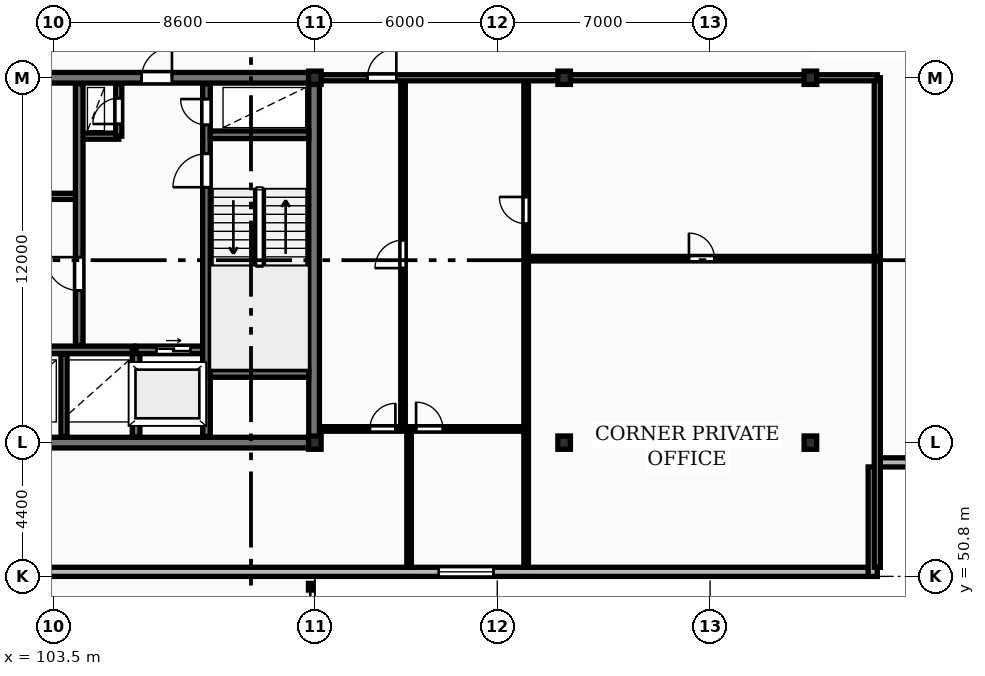
"""IFC4 building model, lengths in metres.
Left out: names, types, materials, properties, quantities, classifications, styles, units other than length and angle.
Written with IfcOpenShell. Run it as: python <this file> out.ifc"""

import sys

from ifc_helpers import new_model, si_unit, direction, frame, frame_2d, origin, origin_2d, place, context, subcontext, project, spatial, rectangle, i_section, extrude, element, fill, save


model = new_model("IFC4")
c1 = context("Model", 3, precision=1e-05, world=origin(), true_north=direction((0.0, 1.0)))
c2 = subcontext(c1, "Body", "Model", "MODEL_VIEW")
j1 = project(units=[si_unit("LENGTHUNIT", "METRE"), si_unit("PLANEANGLEUNIT", "RADIAN")], contexts=[c1])
p1 = place(None, origin())
s1 = spatial("IfcSite", under=j1, at=p1, CompositionType="ELEMENT")
p2 = place(p1, origin())
s2 = spatial("IfcBuilding", under=s1, at=p2, CompositionType="ELEMENT")
p3 = place(p2, frame((0.0, 0.0, 146.5)))
s3 = spatial("IfcBuildingStorey", under=s2, at=p3, CompositionType="ELEMENT", Elevation=146.5)
for number, where, z_axis, x_axis in (
    (1, (112.1, 55.2, 0.0), (0.0, 0.0, 1.0), (1.0, 0.0, 0.0)),
    (2, (112.1, 67.2, 0.0), (0.0, 0.0, 1.0), (1.0, 0.0, 0.0)),
    (3, (120.3, 55.2, 0.0), (0.0, 0.0, 1.0), (1.0, 0.0, 0.0)),
    (4, (120.3, 67.2, 0.0), (0.0, 0.0, 1.0), (1.0, 0.0, 0.0)),
    (5, (128.4, 55.2, 0.0), (0.0, 0.0, 1.0), (1.0, 0.0, 0.0)),
    (6, (128.4, 67.2, 0.0), (0.0, 0.0, 1.0), (1.0, 0.0, 0.0)),
):
    element("IfcColumn", number, at=place(p3, frame(where, z_axis=z_axis, x_axis=x_axis)), inside=s3, PredefinedType="COLUMN", context=c2, shape_type="SweptSolid", body=[
        extrude(i_section(OverallWidth=0.412, OverallDepth=0.437, WebThickness=0.036, FlangeThickness=0.052, FilletRadius=0.015, at=origin_2d()), origin(), (0.0, 0.0, 1.0), 3.6),
    ])
p4 = place(p3, frame((57.6, 50.95, 0.0), z_axis=(0.0, 0.0, 1.0), x_axis=(1.0, 0.0, 0.0)))
e7 = element("IfcWall", 7, at=p4, inside=s3, PredefinedType="STANDARD", context=c2, shape_type="SweptSolid", body=[
    extrude(rectangle(XDim=73.0, YDim=0.3, at=frame_2d((36.5, 0.0))), origin(), (0.0, 0.0, 1.0), 3.31),
])
p5 = place(p4, frame((15.225, 0.0, 0.85)))
e8 = element("IfcOpeningElement", 8, at=p5, cuts=e7, PredefinedType="OPENING", context=c2, shape_type="SweptSolid", body=[
    extrude(rectangle(XDim=1.8, YDim=1.8, at=frame_2d((0.9, 0.9))), frame((0.0, 0.16, 0.0), z_axis=(0.0, -1.0, 0.0), x_axis=(1.0, 0.0, 0.0)), (0.0, 0.0, 1.0), 0.32),
])
p6 = place(p4, frame((58.575, 0.0, 0.85)))
e9 = element("IfcOpeningElement", 9, at=p6, cuts=e7, PredefinedType="OPENING", context=c2, shape_type="SweptSolid", body=[
    extrude(rectangle(XDim=1.8, YDim=1.8, at=frame_2d((0.9, 0.9))), frame((0.0, 0.16, 0.0), z_axis=(0.0, -1.0, 0.0), x_axis=(1.0, 0.0, 0.0)), (0.0, 0.0, 1.0), 0.32),
])
p7 = place(p4, frame((33.45, 0.0, 0.0)))
e10 = element("IfcOpeningElement", 10, at=p7, cuts=e7, PredefinedType="OPENING", context=c2, shape_type="SweptSolid", body=[
    extrude(rectangle(XDim=1.1, YDim=2.1, at=frame_2d((0.55, 1.05))), frame((0.0, 0.16, 0.0), z_axis=(0.0, -1.0, 0.0), x_axis=(1.0, 0.0, 0.0)), (0.0, 0.0, 1.0), 0.32),
])
for number, where, z_axis, x_axis in (
    (11, (130.45, 50.8, 0.0), (0.0, 0.0, 1.0), (0.0, 1.0, 0.0)),
    (12, (130.6, 54.55, 0.0), (0.0, 0.0, 1.0), (1.0, 0.0, 0.0)),
):
    element("IfcWall", number, at=place(p3, frame(where, z_axis=z_axis, x_axis=x_axis)), inside=s3, PredefinedType="STANDARD", context=c2, shape_type="SweptSolid", body=[
        extrude(rectangle(XDim=3.6, YDim=0.3, at=frame_2d((1.8, 0.0))), origin(), (0.0, 0.0, 1.0), 3.31),
    ])
p8 = place(p3, frame((75.95, 55.2, 0.0), z_axis=(0.0, 0.0, 1.0), x_axis=(1.0, 0.0, 0.0)))
e13 = element("IfcWall", 13, at=p8, inside=s3, PredefinedType="SHEAR", context=c2, shape_type="SweptSolid", body=[
    extrude(rectangle(XDim=36.3, YDim=0.35, at=frame_2d((18.15, 0.0))), origin(), (0.0, 0.0, 1.0), 3.6),
])
p9 = place(p8, frame((15.1, 0.0, 0.0)))
e14 = element("IfcOpeningElement", 14, at=p9, cuts=e13, PredefinedType="OPENING", context=c2, shape_type="SweptSolid", body=[
    extrude(rectangle(XDim=1.1, YDim=2.1, at=frame_2d((0.55, 1.05))), frame((0.0, 0.185, 0.0), z_axis=(0.0, -1.0, 0.0), x_axis=(1.0, 0.0, 0.0)), (0.0, 0.0, 1.0), 0.37),
])
p10 = place(p3, frame((112.075, 55.375, 0.0), z_axis=(0.0, 0.0, 1.0), x_axis=(0.0, 1.0, 0.0)))
e15 = element("IfcWall", 15, at=p10, inside=s3, PredefinedType="SHEAR", context=c2, shape_type="SweptSolid", body=[
    extrude(rectangle(XDim=11.65, YDim=0.35, at=frame_2d((5.825, 0.0))), origin(), (0.0, 0.0, 1.0), 3.6),
])
p11 = place(p3, frame((75.95, 67.2, 0.0), z_axis=(0.0, 0.0, 1.0), x_axis=(1.0, 0.0, 0.0)))
e16 = element("IfcWall", 16, at=p11, inside=s3, PredefinedType="SHEAR", context=c2, shape_type="SweptSolid", body=[
    extrude(rectangle(XDim=36.3, YDim=0.35, at=frame_2d((18.15, 0.0))), origin(), (0.0, 0.0, 1.0), 3.6),
])
p12 = place(p11, frame((5.25, 0.0, 0.0)))
e17 = element("IfcOpeningElement", 17, at=p12, cuts=e16, PredefinedType="OPENING", context=c2, shape_type="SweptSolid", body=[
    extrude(rectangle(XDim=1.0, YDim=2.15, at=frame_2d((0.5, 1.075))), frame((0.0, 0.185, 0.0), z_axis=(0.0, -1.0, 0.0), x_axis=(1.0, 0.0, 0.0)), (0.0, 0.0, 1.0), 0.37),
])
p13 = place(p11, frame((21.6, 0.0, 0.0)))
e18 = element("IfcOpeningElement", 18, at=p13, cuts=e16, PredefinedType="OPENING", context=c2, shape_type="SweptSolid", body=[
    extrude(rectangle(XDim=1.5, YDim=2.2, at=frame_2d((0.75, 1.1))), frame((0.0, 0.185, 0.0), z_axis=(0.0, -1.0, 0.0), x_axis=(1.0, 0.0, 0.0)), (0.0, 0.0, 1.0), 0.37),
])
p14 = place(p11, frame((30.45, 0.0, 0.0)))
e19 = element("IfcOpeningElement", 19, at=p14, cuts=e16, PredefinedType="OPENING", context=c2, shape_type="SweptSolid", body=[
    extrude(rectangle(XDim=1.0, YDim=2.15, at=frame_2d((0.5, 1.075))), frame((0.0, 0.185, 0.0), z_axis=(0.0, -1.0, 0.0), x_axis=(1.0, 0.0, 0.0)), (0.0, 0.0, 1.0), 0.37),
])
p15 = place(p3, frame((103.85, 55.4, 0.0), z_axis=(0.0, 0.0, 1.0), x_axis=(0.0, 1.0, 0.0)))
e20 = element("IfcWall", 20, at=p15, inside=s3, PredefinedType="PARTITIONING", context=c2, shape_type="SweptSolid", body=[
    extrude(rectangle(XDim=2.72, YDim=0.2, at=frame_2d((1.36, 0.0))), origin(), (0.0, 0.0, 1.0), 3.31),
])
p16 = place(p3, frame((101.55, 58.25, 0.0), z_axis=(0.0, 0.0, 1.0), x_axis=(1.0, 0.0, 0.0)))
e21 = element("IfcWall", 21, at=p16, inside=s3, PredefinedType="SHEAR", context=c2, shape_type="SweptSolid", body=[
    extrude(rectangle(XDim=4.6, YDim=0.25, at=frame_2d((2.3, 0.0))), origin(), (0.0, 0.0, 1.0), 3.6),
])
p17 = place(p3, frame((106.22, 55.4, 0.0), z_axis=(0.0, 0.0, 1.0), x_axis=(0.0, 1.0, 0.0)))
e22 = element("IfcWall", 22, at=p17, inside=s3, PredefinedType="SHEAR", context=c2, shape_type="SweptSolid", body=[
    extrude(rectangle(XDim=2.85, YDim=0.25, at=frame_2d((1.425, 0.0))), origin(), (0.0, 0.0, 1.0), 3.6),
])
p18 = place(p3, frame((106.22, 58.25, 0.0), z_axis=(0.0, 0.0, 1.0), x_axis=(1.0, 0.0, 0.0)))
e23 = element("IfcWall", 23, at=p18, inside=s3, PredefinedType="SHEAR", context=c2, shape_type="SweptSolid", body=[
    extrude(rectangle(XDim=2.46, YDim=0.25, at=frame_2d((1.23, 0.0))), origin(), (0.0, 0.0, 1.0), 3.6),
])
p19 = place(p18, frame((0.67, 0.0, 0.0)))
e24 = element("IfcOpeningElement", 24, at=p19, cuts=e23, PredefinedType="OPENING", context=c2, shape_type="SweptSolid", body=[
    extrude(rectangle(XDim=1.12, YDim=2.12, at=frame_2d((0.56, 1.06))), frame((0.0, 0.135, 0.0), z_axis=(0.0, -1.0, 0.0), x_axis=(1.0, 0.0, 0.0)), (0.0, 0.0, 1.0), 0.27),
])
p20 = place(p3, frame((84.42, 63.3, 0.0), z_axis=(0.0, 0.0, 1.0), x_axis=(1.0, 0.0, 0.0)))
e25 = element("IfcWall", 25, at=p20, inside=s3, PredefinedType="PARTITIONING", context=c2, shape_type="SweptSolid", body=[
    extrude(rectangle(XDim=19.83, YDim=0.2, at=frame_2d((9.915, 0.0))), origin(), (0.0, 0.0, 1.0), 3.31),
])
p21 = place(p20, frame((1.15, 0.0, 0.0)))
e26 = element("IfcOpeningElement", 26, at=p21, cuts=e25, PredefinedType="OPENING", context=c2, shape_type="SweptSolid", body=[
    extrude(rectangle(XDim=0.85, YDim=2.05, at=frame_2d((0.425, 1.025))), frame((0.0, 0.11, 0.0), z_axis=(0.0, -1.0, 0.0), x_axis=(1.0, 0.0, 0.0)), (0.0, 0.0, 1.0), 0.22),
])
p22 = place(p20, frame((3.25, 0.0, 0.0)))
e27 = element("IfcOpeningElement", 27, at=p22, cuts=e25, PredefinedType="OPENING", context=c2, shape_type="SweptSolid", body=[
    extrude(rectangle(XDim=0.85, YDim=2.05, at=frame_2d((0.425, 1.025))), frame((0.0, 0.11, 0.0), z_axis=(0.0, -1.0, 0.0), x_axis=(1.0, 0.0, 0.0)), (0.0, 0.0, 1.0), 0.22),
])
p23 = place(p20, frame((13.08, 0.0, 0.0)))
e28 = element("IfcOpeningElement", 28, at=p23, cuts=e25, PredefinedType="OPENING", context=c2, shape_type="SweptSolid", body=[
    extrude(rectangle(XDim=1.5, YDim=2.2, at=frame_2d((0.75, 1.1))), frame((0.0, 0.11, 0.0), z_axis=(0.0, -1.0, 0.0), x_axis=(1.0, 0.0, 0.0)), (0.0, 0.0, 1.0), 0.22),
])
p24 = place(p20, frame((6.78, 0.0, 0.0)))
e29 = element("IfcOpeningElement", 29, at=p24, cuts=e25, PredefinedType="OPENING", context=c2, shape_type="SweptSolid", body=[
    extrude(rectangle(XDim=0.92, YDim=2.08, at=frame_2d((0.46, 1.04))), frame((0.0, 0.11, 0.0), z_axis=(0.0, -1.0, 0.0), x_axis=(1.0, 0.0, 0.0)), (0.0, 0.0, 1.0), 0.22),
])
p25 = place(p20, frame((16.28, 0.0, 0.0)))
e30 = element("IfcOpeningElement", 30, at=p25, cuts=e25, PredefinedType="OPENING", context=c2, shape_type="SweptSolid", body=[
    extrude(rectangle(XDim=0.92, YDim=2.08, at=frame_2d((0.46, 1.04))), frame((0.0, 0.11, 0.0), z_axis=(0.0, -1.0, 0.0), x_axis=(1.0, 0.0, 0.0)), (0.0, 0.0, 1.0), 0.22),
])
p26 = place(p3, frame((104.45, 65.28, 0.0), z_axis=(0.0, 0.0, 1.0), x_axis=(1.0, 0.0, 0.0)))
e31 = element("IfcWall", 31, at=p26, inside=s3, PredefinedType="PARTITIONING", context=c2, shape_type="SweptSolid", body=[
    extrude(rectangle(XDim=1.2, YDim=0.2, at=frame_2d((0.6, 0.0))), origin(), (0.0, 0.0, 1.0), 3.31),
])
p27 = place(p3, frame((105.65, 65.28, 0.0), z_axis=(0.0, 0.0, 1.0), x_axis=(0.0, 1.0, 0.0)))
e32 = element("IfcWall", 32, at=p27, inside=s3, PredefinedType="PARTITIONING", context=c2, shape_type="SweptSolid", body=[
    extrude(rectangle(XDim=1.72, YDim=0.2, at=frame_2d((0.86, 0.0))), origin(), (0.0, 0.0, 1.0), 3.31),
])
p28 = place(p27, frame((0.4, 0.0, 0.0)))
e33 = element("IfcOpeningElement", 33, at=p28, cuts=e32, PredefinedType="OPENING", context=c2, shape_type="SweptSolid", body=[
    extrude(rectangle(XDim=0.85, YDim=2.05, at=frame_2d((0.425, 1.025))), frame((0.0, 0.11, 0.0), z_axis=(0.0, -1.0, 0.0), x_axis=(1.0, 0.0, 0.0)), (0.0, 0.0, 1.0), 0.22),
])
p29 = place(p3, frame((104.35, 58.4, 0.0), z_axis=(0.0, 0.0, 1.0), x_axis=(0.0, 1.0, 0.0)))
e34 = element("IfcWall", 34, at=p29, inside=s3, PredefinedType="SHEAR", context=c2, shape_type="SweptSolid", body=[
    extrude(rectangle(XDim=8.6, YDim=0.25, at=frame_2d((4.3, 0.0))), origin(), (0.0, 0.0, 1.0), 3.6),
])
p30 = place(p29, frame((1.8, 0.0, 0.0)))
e35 = element("IfcOpeningElement", 35, at=p30, cuts=e34, PredefinedType="OPENING", context=c2, shape_type="SweptSolid", body=[
    extrude(rectangle(XDim=1.1, YDim=2.1, at=frame_2d((0.55, 1.05))), frame((0.0, 0.135, 0.0), z_axis=(0.0, -1.0, 0.0), x_axis=(1.0, 0.0, 0.0)), (0.0, 0.0, 1.0), 0.27),
])
p31 = place(p3, frame((108.535, 55.4, 0.0), z_axis=(0.0, 0.0, 1.0), x_axis=(0.0, 1.0, 0.0)))
e36 = element("IfcWall", 36, at=p31, inside=s3, PredefinedType="SHEAR", context=c2, shape_type="SweptSolid", body=[
    extrude(rectangle(XDim=11.6, YDim=0.25, at=frame_2d((5.8, 0.0))), origin(), (0.0, 0.0, 1.0), 3.6),
])
p32 = place(p31, frame((8.2, 0.0, 0.0)))
e37 = element("IfcOpeningElement", 37, at=p32, cuts=e36, PredefinedType="OPENING", context=c2, shape_type="SweptSolid", body=[
    extrude(rectangle(XDim=1.1, YDim=2.1, at=frame_2d((0.55, 1.05))), frame((0.0, 0.135, 0.0), z_axis=(0.0, -1.0, 0.0), x_axis=(1.0, 0.0, 0.0)), (0.0, 0.0, 1.0), 0.27),
])
p33 = place(p31, frame((10.25, 0.0, 0.0)))
e38 = element("IfcOpeningElement", 38, at=p33, cuts=e36, PredefinedType="OPENING", context=c2, shape_type="SweptSolid", body=[
    extrude(rectangle(XDim=0.85, YDim=2.05, at=frame_2d((0.425, 1.025))), frame((0.0, 0.135, 0.0), z_axis=(0.0, -1.0, 0.0), x_axis=(1.0, 0.0, 0.0)), (0.0, 0.0, 1.0), 0.27),
])
for number, where, z_axis, x_axis in (
    (39, (108.66, 57.475, 0.0), (0.0, 0.0, 1.0), (1.0, 0.0, 0.0)),
    (40, (108.66, 65.325, 0.0), (0.0, 0.0, 1.0), (1.0, 0.0, 0.0)),
):
    element("IfcWall", number, at=place(p3, frame(where, z_axis=z_axis, x_axis=x_axis)), inside=s3, PredefinedType="SHEAR", context=c2, shape_type="SweptSolid", body=[
        extrude(rectangle(XDim=3.24, YDim=0.25, at=frame_2d((1.62, 0.0))), origin(), (0.0, 0.0, 1.0), 3.6),
    ])
p34 = place(p3, frame((130.6, 51.1, 0.0), z_axis=(0.0, 0.0, 1.0), x_axis=(0.0, 1.0, 0.0)))
e41 = element("IfcWall", 41, at=p34, inside=s3, PredefinedType="PARTITIONING", context=c2, shape_type="SweptSolid", body=[
    extrude(rectangle(XDim=16.1, YDim=0.2, at=frame_2d((8.05, 0.0))), origin(), (0.0, 0.0, 1.0), 3.31),
])
p35 = place(p3, frame((119.05, 61.25, 0.0), z_axis=(0.0, 0.0, 1.0), x_axis=(1.0, 0.0, 0.0)))
e42 = element("IfcWall", 42, at=p35, inside=s3, PredefinedType="PARTITIONING", context=c2, shape_type="SweptSolid", body=[
    extrude(rectangle(XDim=11.55, YDim=0.15, at=frame_2d((5.775, 0.0))), origin(), (0.0, 0.0, 1.0), 3.31),
])
p36 = place(p35, frame((5.355, 0.0, 0.0)))
e43 = element("IfcOpeningElement", 43, at=p36, cuts=e42, PredefinedType="OPENING", context=c2, shape_type="SweptSolid", body=[
    extrude(rectangle(XDim=0.84, YDim=2.04, at=frame_2d((0.42, 1.02))), frame((0.0, 0.085, 0.0), z_axis=(0.0, -1.0, 0.0), x_axis=(1.0, 0.0, 0.0)), (0.0, 0.0, 1.0), 0.17),
])
p37 = place(p3, frame((119.05, 51.1, 0.0), z_axis=(0.0, 0.0, 1.0), x_axis=(0.0, 1.0, 0.0)))
e44 = element("IfcWall", 44, at=p37, inside=s3, PredefinedType="PARTITIONING", context=c2, shape_type="SweptSolid", body=[
    extrude(rectangle(XDim=16.05, YDim=0.15, at=frame_2d((8.025, 0.0))), origin(), (0.0, 0.0, 1.0), 3.31),
])
p38 = place(p37, frame((11.3, 0.0, 0.0)))
e45 = element("IfcOpeningElement", 45, at=p38, cuts=e44, PredefinedType="OPENING", context=c2, shape_type="SweptSolid", body=[
    extrude(rectangle(XDim=0.88, YDim=2.06, at=frame_2d((0.44, 1.03))), frame((0.0, 0.085, 0.0), z_axis=(0.0, -1.0, 0.0), x_axis=(1.0, 0.0, 0.0)), (0.0, 0.0, 1.0), 0.17),
])
p39 = place(p3, frame((115.0, 55.65, 0.0), z_axis=(0.0, 0.0, 1.0), x_axis=(0.0, 1.0, 0.0)))
e46 = element("IfcWall", 46, at=p39, inside=s3, PredefinedType="PARTITIONING", context=c2, shape_type="SweptSolid", body=[
    extrude(rectangle(XDim=11.5, YDim=0.15, at=frame_2d((5.75, 0.0))), origin(), (0.0, 0.0, 1.0), 3.31),
])
p40 = place(p39, frame((5.29, 0.0, 0.0)))
e47 = element("IfcOpeningElement", 47, at=p40, cuts=e46, PredefinedType="OPENING", context=c2, shape_type="SweptSolid", body=[
    extrude(rectangle(XDim=0.92, YDim=2.08, at=frame_2d((0.46, 1.04))), frame((0.0, 0.085, 0.0), z_axis=(0.0, -1.0, 0.0), x_axis=(1.0, 0.0, 0.0)), (0.0, 0.0, 1.0), 0.17),
])
p41 = place(p3, frame((115.2, 51.1, 0.0), z_axis=(0.0, 0.0, 1.0), x_axis=(0.0, 1.0, 0.0)))
e48 = element("IfcWall", 48, at=p41, inside=s3, PredefinedType="PARTITIONING", context=c2, shape_type="SweptSolid", body=[
    extrude(rectangle(XDim=4.55, YDim=0.15, at=frame_2d((2.275, 0.0))), origin(), (0.0, 0.0, 1.0), 3.31),
])
p42 = place(p3, frame((112.27, 55.65, 0.0), z_axis=(0.0, 0.0, 1.0), x_axis=(1.0, 0.0, 0.0)))
e49 = element("IfcWall", 49, at=p42, inside=s3, PredefinedType="PARTITIONING", context=c2, shape_type="SweptSolid", body=[
    extrude(rectangle(XDim=6.76, YDim=0.15, at=frame_2d((3.38, 0.0))), origin(), (0.0, 0.0, 1.0), 3.31),
])
p43 = place(p42, frame((1.64, 0.0, 0.0)))
e50 = element("IfcOpeningElement", 50, at=p43, cuts=e49, PredefinedType="OPENING", context=c2, shape_type="SweptSolid", body=[
    extrude(rectangle(XDim=0.84, YDim=2.04, at=frame_2d((0.42, 1.02))), frame((0.0, 0.085, 0.0), z_axis=(0.0, -1.0, 0.0), x_axis=(1.0, 0.0, 0.0)), (0.0, 0.0, 1.0), 0.17),
])
p44 = place(p42, frame((3.16, 0.0, 0.0)))
e51 = element("IfcOpeningElement", 51, at=p44, cuts=e49, PredefinedType="OPENING", context=c2, shape_type="SweptSolid", body=[
    extrude(rectangle(XDim=0.88, YDim=2.06, at=frame_2d((0.44, 1.03))), frame((0.0, 0.085, 0.0), z_axis=(0.0, -1.0, 0.0), x_axis=(1.0, 0.0, 0.0)), (0.0, 0.0, 1.0), 0.17),
])
p45 = place(p3, frame((112.25, 67.2, 0.0), z_axis=(0.0, 0.0, 1.0), x_axis=(1.0, 0.0, 0.0)))
e52 = element("IfcWall", 52, at=p45, inside=s3, PredefinedType="PARTITIONING", context=c2, shape_type="SweptSolid", body=[
    extrude(rectangle(XDim=18.35, YDim=0.2, at=frame_2d((9.175, 0.0))), origin(), (0.0, 0.0, 1.0), 2.773),
])
p46 = place(p45, frame((1.58, 0.0, 0.0)))
e53 = element("IfcOpeningElement", 53, at=p46, cuts=e52, PredefinedType="OPENING", context=c2, shape_type="SweptSolid", body=[
    extrude(rectangle(XDim=0.95, YDim=2.15, at=frame_2d((0.475, 1.075))), frame((0.0, 0.11, 0.0), z_axis=(0.0, -1.0, 0.0), x_axis=(1.0, 0.0, 0.0)), (0.0, 0.0, 1.0), 0.22),
])
p47 = place(p6, origin())
e54 = element("IfcWindow", 54, at=p47, inside=s3, PartitioningType="SINGLE_PANEL", PredefinedType="WINDOW", context=c2, shape_type="SweptSolid", body=[
    extrude(rectangle(XDim=1.8, YDim=1.8, at=frame_2d((0.9, 0.9))), frame((0.0, 0.03, 0.0), z_axis=(0.0, -1.0, 0.0), x_axis=(1.0, 0.0, 0.0)), (0.0, 0.0, 1.0), 0.06),
])
fill(e9, e54)
p48 = place(p14, origin())
e55 = element("IfcDoor", 55, at=p48, inside=s3, OperationType="SINGLE_SWING_RIGHT", PredefinedType="DOOR", context=c2, shape_type="SweptSolid", body=[
    extrude(rectangle(XDim=1.0, YDim=2.15, at=frame_2d((0.5, 1.075))), frame((0.0, 0.025, 0.0), z_axis=(0.0, -1.0, 0.0), x_axis=(1.0, 0.0, 0.0)), (0.0, 0.0, 1.0), 0.05),
])
fill(e19, e55)
p49 = place(p19, origin())
e56 = element("IfcDoor", 56, at=p49, inside=s3, OperationType="SLIDING_TO_RIGHT", PredefinedType="DOOR", context=c2, shape_type="SweptSolid", body=[
    extrude(rectangle(XDim=1.12, YDim=2.12, at=frame_2d((0.56, 1.06))), frame((0.0, 0.025, 0.0), z_axis=(0.0, -1.0, 0.0), x_axis=(1.0, 0.0, 0.0)), (0.0, 0.0, 1.0), 0.05),
])
fill(e24, e56)
p50 = place(p28, origin())
e57 = element("IfcDoor", 57, at=p50, inside=s3, OperationType="SINGLE_SWING_LEFT", PredefinedType="DOOR", context=c2, shape_type="SweptSolid", body=[
    extrude(rectangle(XDim=0.85, YDim=2.05, at=frame_2d((0.425, 1.025))), frame((0.0, 0.025, 0.0), z_axis=(0.0, -1.0, 0.0), x_axis=(1.0, 0.0, 0.0)), (0.0, 0.0, 1.0), 0.05),
])
fill(e33, e57)
p51 = place(p30, origin())
e58 = element("IfcDoor", 58, at=p51, inside=s3, OperationType="SINGLE_SWING_RIGHT", PredefinedType="DOOR", context=c2, shape_type="SweptSolid", body=[
    extrude(rectangle(XDim=1.1, YDim=2.1, at=frame_2d((0.55, 1.05))), frame((0.0, 0.025, 0.0), z_axis=(0.0, -1.0, 0.0), x_axis=(1.0, 0.0, 0.0)), (0.0, 0.0, 1.0), 0.05),
])
fill(e35, e58)
p52 = place(p32, origin())
e59 = element("IfcDoor", 59, at=p52, inside=s3, OperationType="SINGLE_SWING_LEFT", PredefinedType="DOOR", context=c2, shape_type="SweptSolid", body=[
    extrude(rectangle(XDim=1.1, YDim=2.1, at=frame_2d((0.55, 1.05))), frame((0.0, 0.025, 0.0), z_axis=(0.0, -1.0, 0.0), x_axis=(1.0, 0.0, 0.0)), (0.0, 0.0, 1.0), 0.05),
])
fill(e37, e59)
p53 = place(p33, origin())
e60 = element("IfcDoor", 60, at=p53, inside=s3, OperationType="SINGLE_SWING_RIGHT", PredefinedType="DOOR", context=c2, shape_type="SweptSolid", body=[
    extrude(rectangle(XDim=0.85, YDim=2.05, at=frame_2d((0.425, 1.025))), frame((0.0, 0.025, 0.0), z_axis=(0.0, -1.0, 0.0), x_axis=(1.0, 0.0, 0.0)), (0.0, 0.0, 1.0), 0.05),
])
fill(e38, e60)
p54 = place(p36, origin())
e61 = element("IfcDoor", 61, at=p54, inside=s3, OperationType="SINGLE_SWING_LEFT", PredefinedType="DOOR", context=c2, shape_type="SweptSolid", body=[
    extrude(rectangle(XDim=0.84, YDim=2.04, at=frame_2d((0.42, 1.02))), frame((0.0, 0.025, 0.0), z_axis=(0.0, -1.0, 0.0), x_axis=(1.0, 0.0, 0.0)), (0.0, 0.0, 1.0), 0.05),
])
fill(e43, e61)
p55 = place(p38, origin())
e62 = element("IfcDoor", 62, at=p55, inside=s3, OperationType="SINGLE_SWING_RIGHT", PredefinedType="DOOR", context=c2, shape_type="SweptSolid", body=[
    extrude(rectangle(XDim=0.88, YDim=2.06, at=frame_2d((0.44, 1.03))), frame((0.0, 0.025, 0.0), z_axis=(0.0, -1.0, 0.0), x_axis=(1.0, 0.0, 0.0)), (0.0, 0.0, 1.0), 0.05),
])
fill(e45, e62)
p56 = place(p40, origin())
e63 = element("IfcDoor", 63, at=p56, inside=s3, OperationType="SINGLE_SWING_LEFT", PredefinedType="DOOR", context=c2, shape_type="SweptSolid", body=[
    extrude(rectangle(XDim=0.92, YDim=2.08, at=frame_2d((0.46, 1.04))), frame((0.0, 0.025, 0.0), z_axis=(0.0, -1.0, 0.0), x_axis=(1.0, 0.0, 0.0)), (0.0, 0.0, 1.0), 0.05),
])
fill(e47, e63)
p57 = place(p43, origin())
e64 = element("IfcDoor", 64, at=p57, inside=s3, OperationType="SINGLE_SWING_RIGHT", PredefinedType="DOOR", context=c2, shape_type="SweptSolid", body=[
    extrude(rectangle(XDim=0.84, YDim=2.04, at=frame_2d((0.42, 1.02))), frame((0.0, 0.025, 0.0), z_axis=(0.0, -1.0, 0.0), x_axis=(1.0, 0.0, 0.0)), (0.0, 0.0, 1.0), 0.05),
])
fill(e50, e64)
p58 = place(p44, origin())
e65 = element("IfcDoor", 65, at=p58, inside=s3, OperationType="SINGLE_SWING_LEFT", PredefinedType="DOOR", context=c2, shape_type="SweptSolid", body=[
    extrude(rectangle(XDim=0.88, YDim=2.06, at=frame_2d((0.44, 1.03))), frame((0.0, 0.025, 0.0), z_axis=(0.0, -1.0, 0.0), x_axis=(1.0, 0.0, 0.0)), (0.0, 0.0, 1.0), 0.05),
])
fill(e51, e65)
p59 = place(p46, origin())
e66 = element("IfcDoor", 66, at=p59, inside=s3, OperationType="SINGLE_SWING_RIGHT", PredefinedType="DOOR", context=c2, shape_type="SweptSolid", body=[
    extrude(rectangle(XDim=0.95, YDim=2.15, at=frame_2d((0.475, 1.075))), frame((0.0, 0.025, 0.0), z_axis=(0.0, -1.0, 0.0), x_axis=(1.0, 0.0, 0.0)), (0.0, 0.0, 1.0), 0.05),
])
fill(e53, e66)
save(model, sys.argv[1])
